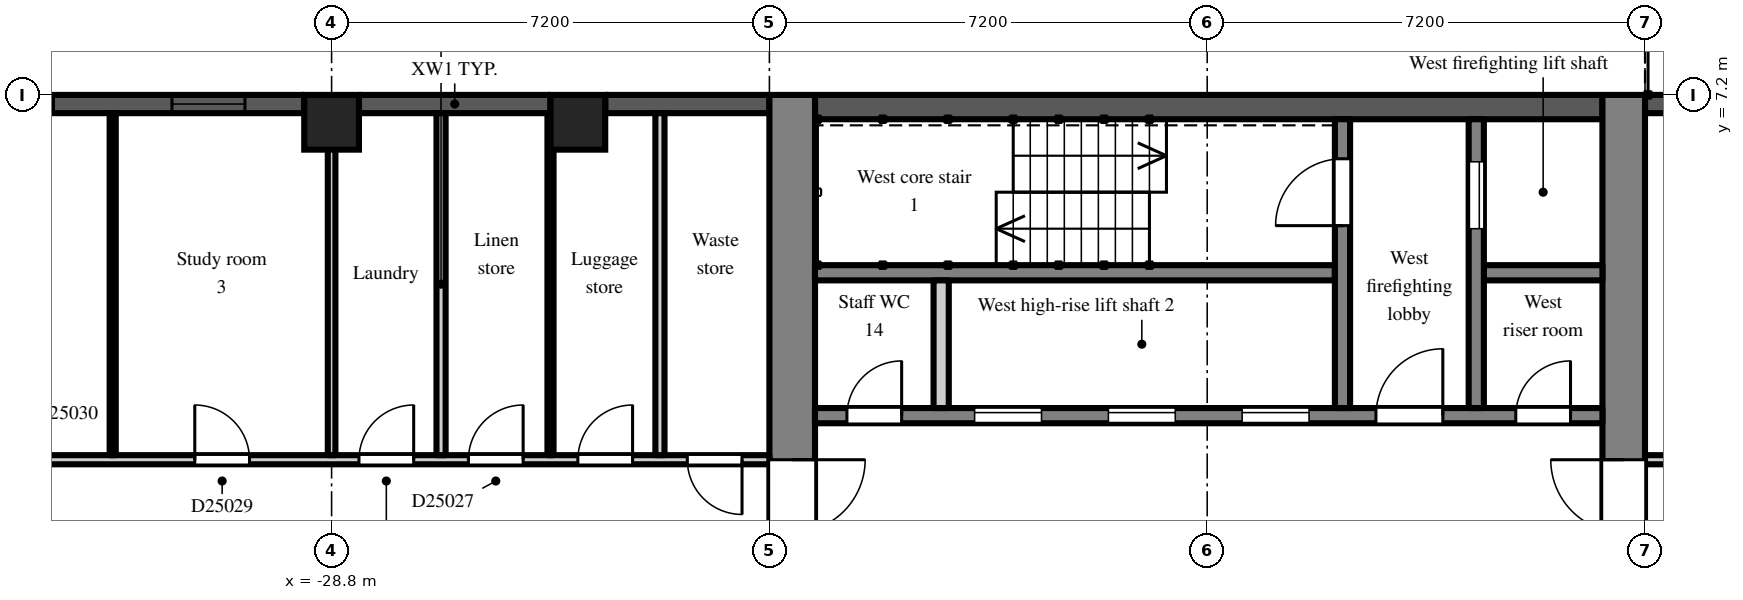
"""IFC4 building model, lengths in metres.
Left out: names, types, materials, properties, quantities, classifications, styles, units other than length and angle.
Written with IfcOpenShell. Run it as: python <this file> out.ifc"""

import sys

from ifc_helpers import new_model, si_unit, direction, frame, frame_2d, origin, origin_2d, place, context, subcontext, project, spatial, rectangle, extrude, element, fill, save


model = new_model("IFC4")
c1 = context("Model", 3, precision=1e-05, world=origin(), true_north=direction((0.0, 1.0)))
c2 = subcontext(c1, "Body", "Model", "MODEL_VIEW")
j1 = project(units=[si_unit("LENGTHUNIT", "METRE"), si_unit("PLANEANGLEUNIT", "RADIAN")], contexts=[c1])
p1 = place(None, origin())
s1 = spatial("IfcSite", under=j1, at=p1, CompositionType="ELEMENT")
p2 = place(p1, origin())
s2 = spatial("IfcBuilding", under=s1, at=p2, CompositionType="ELEMENT")
p3 = place(p2, frame((0.0, 0.0, 170.7)))
s3 = spatial("IfcBuildingStorey", under=s2, at=p3, CompositionType="ELEMENT", Elevation=170.7)
for number, where, z_axis, x_axis in (
    (1, (-28.8, 6.75, 0.0), (0.0, 0.0, 1.0), (1.0, 0.0, 0.0)),
    (2, (-24.75, 6.75, 0.0), (0.0, 0.0, 1.0), (1.0, 0.0, 0.0)),
):
    element("IfcColumn", number, at=place(p3, frame(where, z_axis=z_axis, x_axis=x_axis)), inside=s3, PredefinedType="COLUMN", context=c2, shape_type="SweptSolid", body=[
        extrude(rectangle(XDim=0.9, YDim=0.9, at=origin_2d()), origin(), (0.0, 0.0, 1.0), 3.0),
    ])
p4 = place(p3, frame((-4.2, 7.05, 0.0), z_axis=(0.0, 0.0, 1.0), x_axis=(-1.0, 0.0, 0.0)))
e3 = element("IfcWall", 3, at=p4, inside=s3, PredefinedType="SOLIDWALL", context=c2, shape_type="SweptSolid", body=[
    extrude(rectangle(XDim=3.0, YDim=0.3, at=frame_2d((1.5, 0.0))), origin(), (0.0, 0.0, 1.0), 2.2),
])
p5 = place(p3, frame((-21.6, 7.05, 0.0), z_axis=(0.0, 0.0, 1.0), x_axis=(-1.0, 0.0, 0.0)))
e4 = element("IfcWall", 4, at=p5, inside=s3, PredefinedType="SOLIDWALL", context=c2, shape_type="SweptSolid", body=[
    extrude(rectangle(XDim=2.7, YDim=0.3, at=frame_2d((1.35, 0.0))), origin(), (0.0, 0.0, 1.0), 2.2),
])
p6 = place(p3, frame((-25.2, 7.05, 0.0), z_axis=(0.0, 0.0, 1.0), x_axis=(-1.0, 0.0, 0.0)))
e5 = element("IfcWall", 5, at=p6, inside=s3, PredefinedType="SOLIDWALL", context=c2, shape_type="SweptSolid", body=[
    extrude(rectangle(XDim=3.15, YDim=0.3, at=frame_2d((1.575, 0.0))), origin(), (0.0, 0.0, 1.0), 2.2),
])
p7 = place(p3, frame((-29.25, 7.05, 0.0), z_axis=(0.0, 0.0, 1.0), x_axis=(-1.0, 0.0, 0.0)))
e6 = element("IfcWall", 6, at=p7, inside=s3, PredefinedType="SOLIDWALL", context=c2, shape_type="SweptSolid", body=[
    extrude(rectangle(XDim=6.3, YDim=0.3, at=frame_2d((3.15, 0.0))), origin(), (0.0, 0.0, 1.0), 2.2),
])
p8 = place(p7, frame((0.975, 0.0, 0.2)))
e7 = element("IfcOpeningElement", 7, at=p8, cuts=e6, PredefinedType="OPENING", context=c2, shape_type="SweptSolid", body=[
    extrude(rectangle(XDim=1.2, YDim=1.85, at=frame_2d((0.6, 0.925))), frame((0.0, 0.16, 0.0), z_axis=(0.0, -1.0, 0.0), x_axis=(1.0, 0.0, 0.0)), (0.0, 0.0, 1.0), 0.32),
])
p9 = place(p7, frame((4.125, 0.0, 0.2)))
e8 = element("IfcOpeningElement", 8, at=p9, cuts=e6, PredefinedType="OPENING", context=c2, shape_type="SweptSolid", body=[
    extrude(rectangle(XDim=1.2, YDim=1.85, at=frame_2d((0.6, 0.925))), frame((0.0, 0.16, 0.0), z_axis=(0.0, -1.0, 0.0), x_axis=(1.0, 0.0, 0.0)), (0.0, 0.0, 1.0), 0.32),
])
p10 = place(p3, frame((-7.55, -7.2, 0.0), z_axis=(0.0, 0.0, 1.0), x_axis=(0.0, 1.0, 0.0)))
e9 = element("IfcWall", 9, at=p10, inside=s3, PredefinedType="SHEAR", context=c2, shape_type="SweptSolid", body=[
    extrude(rectangle(XDim=14.4, YDim=0.7, at=frame_2d((7.2, 0.0))), origin(), (0.0, 0.0, 1.0), 2.6),
])
p11 = place(p10, frame((6.0, 0.0, 0.0)))
e10 = element("IfcOpeningElement", 10, at=p11, cuts=e9, PredefinedType="OPENING", context=c2, shape_type="SweptSolid", body=[
    extrude(rectangle(XDim=2.4, YDim=2.2, at=frame_2d((1.2, 1.1))), frame((0.0, 0.36, 0.0), z_axis=(0.0, -1.0, 0.0), x_axis=(1.0, 0.0, 0.0)), (0.0, 0.0, 1.0), 0.72),
])
p12 = place(p3, frame((-21.225, -7.2, 0.0), z_axis=(0.0, 0.0, 1.0), x_axis=(0.0, 1.0, 0.0)))
e11 = element("IfcWall", 11, at=p12, inside=s3, PredefinedType="SHEAR", context=c2, shape_type="SweptSolid", body=[
    extrude(rectangle(XDim=14.4, YDim=0.75, at=frame_2d((7.2, 0.0))), origin(), (0.0, 0.0, 1.0), 2.6),
])
p13 = place(p12, frame((6.0, 0.0, 0.0)))
e12 = element("IfcOpeningElement", 12, at=p13, cuts=e11, PredefinedType="OPENING", context=c2, shape_type="SweptSolid", body=[
    extrude(rectangle(XDim=2.4, YDim=2.2, at=frame_2d((1.2, 1.1))), frame((0.0, 0.385, 0.0), z_axis=(0.0, -1.0, 0.0), x_axis=(1.0, 0.0, 0.0)), (0.0, 0.0, 1.0), 0.77),
])
p14 = place(p3, frame((-7.9, 7.0, 0.0), z_axis=(0.0, 0.0, 1.0), x_axis=(-1.0, 0.0, 0.0)))
e13 = element("IfcWall", 13, at=p14, inside=s3, PredefinedType="SHEAR", context=c2, shape_type="SweptSolid", body=[
    extrude(rectangle(XDim=12.95, YDim=0.4, at=frame_2d((6.475, 0.0))), origin(), (0.0, 0.0, 1.0), 2.6),
])
p15 = place(p3, frame((-7.9, 1.925, 0.0), z_axis=(0.0, 0.0, 1.0), x_axis=(-1.0, 0.0, 0.0)))
e14 = element("IfcWall", 14, at=p15, inside=s3, PredefinedType="SHEAR", context=c2, shape_type="SweptSolid", body=[
    extrude(rectangle(XDim=12.95, YDim=0.25, at=frame_2d((6.475, 0.0))), origin(), (0.0, 0.0, 1.0), 2.6),
])
p16 = place(p15, frame((4.825, 0.0, 0.0)))
e15 = element("IfcOpeningElement", 15, at=p16, cuts=e14, PredefinedType="OPENING", context=c2, shape_type="SweptSolid", body=[
    extrude(rectangle(XDim=1.1, YDim=2.1, at=frame_2d((0.55, 1.05))), frame((0.0, 0.135, 0.0), z_axis=(0.0, -1.0, 0.0), x_axis=(1.0, 0.0, 0.0)), (0.0, 0.0, 1.0), 0.27),
])
p17 = place(p15, frame((7.025, 0.0, 0.0)))
e16 = element("IfcOpeningElement", 16, at=p17, cuts=e14, PredefinedType="OPENING", context=c2, shape_type="SweptSolid", body=[
    extrude(rectangle(XDim=1.1, YDim=2.1, at=frame_2d((0.55, 1.05))), frame((0.0, 0.135, 0.0), z_axis=(0.0, -1.0, 0.0), x_axis=(1.0, 0.0, 0.0)), (0.0, 0.0, 1.0), 0.27),
])
p18 = place(p15, frame((9.225, 0.0, 0.0)))
e17 = element("IfcOpeningElement", 17, at=p18, cuts=e14, PredefinedType="OPENING", context=c2, shape_type="SweptSolid", body=[
    extrude(rectangle(XDim=1.1, YDim=2.1, at=frame_2d((0.55, 1.05))), frame((0.0, 0.135, 0.0), z_axis=(0.0, -1.0, 0.0), x_axis=(1.0, 0.0, 0.0)), (0.0, 0.0, 1.0), 0.27),
])
p19 = place(p15, frame((0.525, 0.0, 0.0)))
e18 = element("IfcOpeningElement", 18, at=p19, cuts=e14, PredefinedType="OPENING", context=c2, shape_type="SweptSolid", body=[
    extrude(rectangle(XDim=0.9, YDim=2.1, at=frame_2d((0.45, 1.05))), frame((0.0, 0.135, 0.0), z_axis=(0.0, -1.0, 0.0), x_axis=(1.0, 0.0, 0.0)), (0.0, 0.0, 1.0), 0.27),
])
p20 = place(p15, frame((2.625, 0.0, 0.0)))
e19 = element("IfcOpeningElement", 19, at=p20, cuts=e14, PredefinedType="OPENING", context=c2, shape_type="SweptSolid", body=[
    extrude(rectangle(XDim=1.1, YDim=2.1, at=frame_2d((0.55, 1.05))), frame((0.0, 0.135, 0.0), z_axis=(0.0, -1.0, 0.0), x_axis=(1.0, 0.0, 0.0)), (0.0, 0.0, 1.0), 0.27),
])
p21 = place(p15, frame((11.525, 0.0, 0.0)))
e20 = element("IfcOpeningElement", 20, at=p21, cuts=e14, PredefinedType="OPENING", context=c2, shape_type="SweptSolid", body=[
    extrude(rectangle(XDim=0.9, YDim=2.1, at=frame_2d((0.45, 1.05))), frame((0.0, 0.135, 0.0), z_axis=(0.0, -1.0, 0.0), x_axis=(1.0, 0.0, 0.0)), (0.0, 0.0, 1.0), 0.27),
])
p22 = place(p3, frame((-7.9, 4.275, 0.0), z_axis=(0.0, 0.0, 1.0), x_axis=(-1.0, 0.0, 0.0)))
e21 = element("IfcWall", 21, at=p22, inside=s3, PredefinedType="SHEAR", context=c2, shape_type="SweptSolid", body=[
    extrude(rectangle(XDim=1.95, YDim=0.25, at=frame_2d((0.975, 0.0))), origin(), (0.0, 0.0, 1.0), 2.6),
])
p23 = place(p3, frame((-12.3, 4.275, 0.0), z_axis=(0.0, 0.0, 1.0), x_axis=(-1.0, 0.0, 0.0)))
e22 = element("IfcWall", 22, at=p23, inside=s3, PredefinedType="SHEAR", context=c2, shape_type="SweptSolid", body=[
    extrude(rectangle(XDim=8.55, YDim=0.25, at=frame_2d((4.275, 0.0))), origin(), (0.0, 0.0, 1.0), 2.6),
])
p24 = place(p3, frame((-9.975, 2.05, 0.0), z_axis=(0.0, 0.0, 1.0), x_axis=(0.0, 1.0, 0.0)))
e23 = element("IfcWall", 23, at=p24, inside=s3, PredefinedType="SHEAR", context=c2, shape_type="SweptSolid", body=[
    extrude(rectangle(XDim=4.75, YDim=0.25, at=frame_2d((2.375, 0.0))), origin(), (0.0, 0.0, 1.0), 2.6),
])
p25 = place(p24, frame((2.95, 0.0, 0.0)))
e24 = element("IfcOpeningElement", 24, at=p25, cuts=e23, PredefinedType="OPENING", context=c2, shape_type="SweptSolid", body=[
    extrude(rectangle(XDim=1.1, YDim=2.1, at=frame_2d((0.55, 1.05))), frame((0.0, 0.135, 0.0), z_axis=(0.0, -1.0, 0.0), x_axis=(1.0, 0.0, 0.0)), (0.0, 0.0, 1.0), 0.27),
])
p26 = place(p3, frame((-12.175, 2.05, 0.0), z_axis=(0.0, 0.0, 1.0), x_axis=(0.0, 1.0, 0.0)))
e25 = element("IfcWall", 25, at=p26, inside=s3, PredefinedType="SHEAR", context=c2, shape_type="SweptSolid", body=[
    extrude(rectangle(XDim=4.75, YDim=0.25, at=frame_2d((2.375, 0.0))), origin(), (0.0, 0.0, 1.0), 2.6),
])
p27 = place(p26, frame((3.0, 0.0, 0.0)))
e26 = element("IfcOpeningElement", 26, at=p27, cuts=e25, PredefinedType="OPENING", context=c2, shape_type="SweptSolid", body=[
    extrude(rectangle(XDim=1.1, YDim=2.1, at=frame_2d((0.55, 1.05))), frame((0.0, 0.135, 0.0), z_axis=(0.0, -1.0, 0.0), x_axis=(1.0, 0.0, 0.0)), (0.0, 0.0, 1.0), 0.27),
])
p28 = place(p3, frame((-18.775, 2.05, 0.0), z_axis=(0.0, 0.0, 1.0), x_axis=(0.0, 1.0, 0.0)))
e27 = element("IfcWall", 27, at=p28, inside=s3, PredefinedType="PARTITIONING", context=c2, shape_type="SweptSolid", body=[
    extrude(rectangle(XDim=2.1, YDim=0.25, at=frame_2d((1.05, 0.0))), origin(), (0.0, 0.0, 1.0), 2.6),
])
p29 = place(p3, frame((-36.5, 1.2, 0.0), z_axis=(0.0, 0.0, 1.0), x_axis=(1.0, 0.0, 0.0)))
e28 = element("IfcWall", 28, at=p29, inside=s3, PredefinedType="PARTITIONING", context=c2, shape_type="SweptSolid", body=[
    extrude(rectangle(XDim=14.9, YDim=0.15, at=frame_2d((7.45, 0.0))), origin(), (0.0, 0.0, 1.0), 2.6),
])
p30 = place(p29, frame((13.55, 0.0, 0.0)))
e29 = element("IfcOpeningElement", 29, at=p30, cuts=e28, PredefinedType="OPENING", context=c2, shape_type="SweptSolid", body=[
    extrude(rectangle(XDim=0.9, YDim=2.1, at=frame_2d((0.45, 1.05))), frame((0.0, 0.085, 0.0), z_axis=(0.0, -1.0, 0.0), x_axis=(1.0, 0.0, 0.0)), (0.0, 0.0, 1.0), 0.17),
])
p31 = place(p29, frame((11.75, 0.0, 0.0)))
e30 = element("IfcOpeningElement", 30, at=p31, cuts=e28, PredefinedType="OPENING", context=c2, shape_type="SweptSolid", body=[
    extrude(rectangle(XDim=0.9, YDim=2.1, at=frame_2d((0.45, 1.05))), frame((0.0, 0.085, 0.0), z_axis=(0.0, -1.0, 0.0), x_axis=(1.0, 0.0, 0.0)), (0.0, 0.0, 1.0), 0.17),
])
p32 = place(p29, frame((9.95, 0.0, 0.0)))
e31 = element("IfcOpeningElement", 31, at=p32, cuts=e28, PredefinedType="OPENING", context=c2, shape_type="SweptSolid", body=[
    extrude(rectangle(XDim=0.9, YDim=2.1, at=frame_2d((0.45, 1.05))), frame((0.0, 0.085, 0.0), z_axis=(0.0, -1.0, 0.0), x_axis=(1.0, 0.0, 0.0)), (0.0, 0.0, 1.0), 0.17),
])
p33 = place(p29, frame((8.15, 0.0, 0.0)))
e32 = element("IfcOpeningElement", 32, at=p33, cuts=e28, PredefinedType="OPENING", context=c2, shape_type="SweptSolid", body=[
    extrude(rectangle(XDim=0.9, YDim=2.1, at=frame_2d((0.45, 1.05))), frame((0.0, 0.085, 0.0), z_axis=(0.0, -1.0, 0.0), x_axis=(1.0, 0.0, 0.0)), (0.0, 0.0, 1.0), 0.17),
])
p34 = place(p29, frame((5.45, 0.0, 0.0)))
e33 = element("IfcOpeningElement", 33, at=p34, cuts=e28, PredefinedType="OPENING", context=c2, shape_type="SweptSolid", body=[
    extrude(rectangle(XDim=0.9, YDim=2.1, at=frame_2d((0.45, 1.05))), frame((0.0, 0.085, 0.0), z_axis=(0.0, -1.0, 0.0), x_axis=(1.0, 0.0, 0.0)), (0.0, 0.0, 1.0), 0.17),
])
p35 = place(p29, frame((1.15, 0.0, 0.0)))
e34 = element("IfcOpeningElement", 34, at=p35, cuts=e28, PredefinedType="OPENING", context=c2, shape_type="SweptSolid", body=[
    extrude(rectangle(XDim=1.8, YDim=2.1, at=frame_2d((0.9, 1.05))), frame((0.0, 0.085, 0.0), z_axis=(0.0, -1.0, 0.0), x_axis=(1.0, 0.0, 0.0)), (0.0, 0.0, 1.0), 0.17),
])
p36 = place(p3, frame((-32.4, 1.275, 0.0), z_axis=(0.0, 0.0, 1.0), x_axis=(0.0, 1.0, 0.0)))
e35 = element("IfcWall", 35, at=p36, inside=s3, PredefinedType="PARTITIONING", context=c2, shape_type="SweptSolid", body=[
    extrude(rectangle(XDim=5.625, YDim=0.1, at=frame_2d((2.812, 0.0))), origin(), (0.0, 0.0, 1.0), 2.6),
])
p37 = place(p3, frame((-28.8, 1.275, 0.0), z_axis=(0.0, 0.0, 1.0), x_axis=(0.0, 1.0, 0.0)))
e36 = element("IfcWall", 36, at=p37, inside=s3, PredefinedType="PARTITIONING", context=c2, shape_type="SweptSolid", body=[
    extrude(rectangle(XDim=5.625, YDim=0.125, at=frame_2d((2.812, 0.0))), origin(), (0.0, 0.0, 1.0), 2.6),
])
p38 = place(p3, frame((-27.0, 1.275, 0.0), z_axis=(0.0, 0.0, 1.0), x_axis=(0.0, 1.0, 0.0)))
e37 = element("IfcWall", 37, at=p38, inside=s3, PredefinedType="PARTITIONING", context=c2, shape_type="SweptSolid", body=[
    extrude(rectangle(XDim=5.625, YDim=0.15, at=frame_2d((2.812, 0.0))), origin(), (0.0, 0.0, 1.0), 2.6),
])
p39 = place(p3, frame((-25.2, 1.275, 0.0), z_axis=(0.0, 0.0, 1.0), x_axis=(0.0, 1.0, 0.0)))
e38 = element("IfcWall", 38, at=p39, inside=s3, PredefinedType="PARTITIONING", context=c2, shape_type="SweptSolid", body=[
    extrude(rectangle(XDim=5.625, YDim=0.1, at=frame_2d((2.812, 0.0))), origin(), (0.0, 0.0, 1.0), 2.6),
])
p40 = place(p3, frame((-23.4, 1.275, 0.0), z_axis=(0.0, 0.0, 1.0), x_axis=(0.0, 1.0, 0.0)))
e39 = element("IfcWall", 39, at=p40, inside=s3, PredefinedType="PARTITIONING", context=c2, shape_type="SweptSolid", body=[
    extrude(rectangle(XDim=5.625, YDim=0.15, at=frame_2d((2.812, 0.0))), origin(), (0.0, 0.0, 1.0), 2.6),
])
p41 = place(p3, frame((-7.2, 1.2, 0.0), z_axis=(0.0, 0.0, 1.0), x_axis=(1.0, 0.0, 0.0)))
e40 = element("IfcWall", 40, at=p41, inside=s3, PredefinedType="PARTITIONING", context=c2, shape_type="SweptSolid", body=[
    extrude(rectangle(XDim=6.075, YDim=0.15, at=frame_2d((3.038, 0.0))), origin(), (0.0, 0.0, 1.0), 2.6),
])
p42 = place(p41, frame((1.55, 0.0, 0.0)))
e41 = element("IfcOpeningElement", 41, at=p42, cuts=e40, PredefinedType="OPENING", context=c2, shape_type="SweptSolid", body=[
    extrude(rectangle(XDim=0.9, YDim=2.1, at=frame_2d((0.45, 1.05))), frame((0.0, 0.085, 0.0), z_axis=(0.0, -1.0, 0.0), x_axis=(1.0, 0.0, 0.0)), (0.0, 0.0, 1.0), 0.17),
])
p43 = place(p8, origin())
e42 = element("IfcWindow", 42, at=p43, inside=s3, PartitioningType="SINGLE_PANEL", PredefinedType="WINDOW", context=c2, shape_type="SweptSolid", body=[
    extrude(rectangle(XDim=1.2, YDim=1.85, at=frame_2d((0.6, 0.925))), frame((0.0, 0.03, 0.0), z_axis=(0.0, -1.0, 0.0), x_axis=(1.0, 0.0, 0.0)), (0.0, 0.0, 1.0), 0.06),
])
fill(e7, e42)
p44 = place(p9, origin())
e43 = element("IfcWindow", 43, at=p44, inside=s3, PartitioningType="SINGLE_PANEL", PredefinedType="WINDOW", context=c2, shape_type="SweptSolid", body=[
    extrude(rectangle(XDim=1.2, YDim=1.85, at=frame_2d((0.6, 0.925))), frame((0.0, 0.03, 0.0), z_axis=(0.0, -1.0, 0.0), x_axis=(1.0, 0.0, 0.0)), (0.0, 0.0, 1.0), 0.06),
])
fill(e8, e43)
p45 = place(p16, origin())
e44 = element("IfcDoor", 44, at=p45, inside=s3, OperationType="SLIDING_TO_LEFT", PredefinedType="DOOR", context=c2, shape_type="SweptSolid", body=[
    extrude(rectangle(XDim=1.1, YDim=2.1, at=frame_2d((0.55, 1.05))), frame((0.0, 0.025, 0.0), z_axis=(0.0, -1.0, 0.0), x_axis=(1.0, 0.0, 0.0)), (0.0, 0.0, 1.0), 0.05),
])
fill(e15, e44)
p46 = place(p17, origin())
e45 = element("IfcDoor", 45, at=p46, inside=s3, OperationType="SLIDING_TO_LEFT", PredefinedType="DOOR", context=c2, shape_type="SweptSolid", body=[
    extrude(rectangle(XDim=1.1, YDim=2.1, at=frame_2d((0.55, 1.05))), frame((0.0, 0.025, 0.0), z_axis=(0.0, -1.0, 0.0), x_axis=(1.0, 0.0, 0.0)), (0.0, 0.0, 1.0), 0.05),
])
fill(e16, e45)
p47 = place(p18, origin())
e46 = element("IfcDoor", 46, at=p47, inside=s3, OperationType="SLIDING_TO_LEFT", PredefinedType="DOOR", context=c2, shape_type="SweptSolid", body=[
    extrude(rectangle(XDim=1.1, YDim=2.1, at=frame_2d((0.55, 1.05))), frame((0.0, 0.025, 0.0), z_axis=(0.0, -1.0, 0.0), x_axis=(1.0, 0.0, 0.0)), (0.0, 0.0, 1.0), 0.05),
])
fill(e17, e46)
p48 = place(p25, origin())
e47 = element("IfcDoor", 47, at=p48, inside=s3, OperationType="SLIDING_TO_LEFT", PredefinedType="DOOR", context=c2, shape_type="SweptSolid", body=[
    extrude(rectangle(XDim=1.1, YDim=2.1, at=frame_2d((0.55, 1.05))), frame((0.0, 0.025, 0.0), z_axis=(0.0, -1.0, 0.0), x_axis=(1.0, 0.0, 0.0)), (0.0, 0.0, 1.0), 0.05),
])
fill(e24, e47)
p49 = place(p27, origin())
e48 = element("IfcDoor", 48, at=p49, inside=s3, OperationType="SINGLE_SWING_LEFT", PredefinedType="DOOR", context=c2, shape_type="SweptSolid", body=[
    extrude(rectangle(XDim=1.1, YDim=2.1, at=frame_2d((0.55, 1.05))), frame((0.0, 0.025, 0.0), z_axis=(0.0, -1.0, 0.0), x_axis=(1.0, 0.0, 0.0)), (0.0, 0.0, 1.0), 0.05),
])
fill(e26, e48)
p50 = place(p19, frame((0.9, 0.0, 0.0), z_axis=(0.0, 0.0, 1.0), x_axis=(-1.0, 0.0, 0.0)))
e49 = element("IfcDoor", 49, at=p50, inside=s3, OperationType="SINGLE_SWING_RIGHT", PredefinedType="DOOR", context=c2, shape_type="SweptSolid", body=[
    extrude(rectangle(XDim=0.9, YDim=2.1, at=frame_2d((0.45, 1.05))), frame((0.0, 0.025, 0.0), z_axis=(0.0, -1.0, 0.0), x_axis=(1.0, 0.0, 0.0)), (0.0, 0.0, 1.0), 0.05),
])
fill(e18, e49)
p51 = place(p20, frame((1.1, 0.0, 0.0), z_axis=(0.0, 0.0, 1.0), x_axis=(-1.0, 0.0, 0.0)))
e50 = element("IfcDoor", 50, at=p51, inside=s3, OperationType="SINGLE_SWING_RIGHT", PredefinedType="DOOR", context=c2, shape_type="SweptSolid", body=[
    extrude(rectangle(XDim=1.1, YDim=2.1, at=frame_2d((0.55, 1.05))), frame((0.0, 0.025, 0.0), z_axis=(0.0, -1.0, 0.0), x_axis=(1.0, 0.0, 0.0)), (0.0, 0.0, 1.0), 0.05),
])
fill(e19, e50)
p52 = place(p11, origin())
e51 = element("IfcDoor", 51, at=p52, inside=s3, OperationType="DOUBLE_DOOR_DOUBLE_SWING", PredefinedType="DOOR", context=c2, shape_type="SweptSolid", body=[
    extrude(rectangle(XDim=2.4, YDim=2.2, at=frame_2d((1.2, 1.1))), frame((0.0, 0.025, 0.0), z_axis=(0.0, -1.0, 0.0), x_axis=(1.0, 0.0, 0.0)), (0.0, 0.0, 1.0), 0.05),
])
fill(e10, e51)
p53 = place(p13, frame((2.4, 0.0, 0.0), z_axis=(0.0, 0.0, 1.0), x_axis=(-1.0, 0.0, 0.0)))
e52 = element("IfcDoor", 52, at=p53, inside=s3, OperationType="DOUBLE_DOOR_DOUBLE_SWING", PredefinedType="DOOR", context=c2, shape_type="SweptSolid", body=[
    extrude(rectangle(XDim=2.4, YDim=2.2, at=frame_2d((1.2, 1.1))), frame((0.0, 0.025, 0.0), z_axis=(0.0, -1.0, 0.0), x_axis=(1.0, 0.0, 0.0)), (0.0, 0.0, 1.0), 0.05),
])
fill(e12, e52)
p54 = place(p21, frame((0.9, 0.0, 0.0), z_axis=(0.0, 0.0, 1.0), x_axis=(-1.0, 0.0, 0.0)))
e53 = element("IfcDoor", 53, at=p54, inside=s3, OperationType="SINGLE_SWING_RIGHT", PredefinedType="DOOR", context=c2, shape_type="SweptSolid", body=[
    extrude(rectangle(XDim=0.9, YDim=2.1, at=frame_2d((0.45, 1.05))), frame((0.0, 0.025, 0.0), z_axis=(0.0, -1.0, 0.0), x_axis=(1.0, 0.0, 0.0)), (0.0, 0.0, 1.0), 0.05),
])
fill(e20, e53)
p55 = place(p30, frame((0.9, 0.0, 0.0), z_axis=(0.0, 0.0, 1.0), x_axis=(-1.0, 0.0, 0.0)))
e54 = element("IfcDoor", 54, at=p55, inside=s3, OperationType="SINGLE_SWING_LEFT", PredefinedType="DOOR", context=c2, shape_type="SweptSolid", body=[
    extrude(rectangle(XDim=0.9, YDim=2.1, at=frame_2d((0.45, 1.05))), frame((0.0, 0.025, 0.0), z_axis=(0.0, -1.0, 0.0), x_axis=(1.0, 0.0, 0.0)), (0.0, 0.0, 1.0), 0.05),
])
fill(e29, e54)
p56 = place(p31, origin())
e55 = element("IfcDoor", 55, at=p56, inside=s3, OperationType="SINGLE_SWING_RIGHT", PredefinedType="DOOR", context=c2, shape_type="SweptSolid", body=[
    extrude(rectangle(XDim=0.9, YDim=2.1, at=frame_2d((0.45, 1.05))), frame((0.0, 0.025, 0.0), z_axis=(0.0, -1.0, 0.0), x_axis=(1.0, 0.0, 0.0)), (0.0, 0.0, 1.0), 0.05),
])
fill(e30, e55)
p57 = place(p32, origin())
e56 = element("IfcDoor", 56, at=p57, inside=s3, OperationType="SINGLE_SWING_RIGHT", PredefinedType="DOOR", context=c2, shape_type="SweptSolid", body=[
    extrude(rectangle(XDim=0.9, YDim=2.1, at=frame_2d((0.45, 1.05))), frame((0.0, 0.025, 0.0), z_axis=(0.0, -1.0, 0.0), x_axis=(1.0, 0.0, 0.0)), (0.0, 0.0, 1.0), 0.05),
])
fill(e31, e56)
p58 = place(p33, origin())
e57 = element("IfcDoor", 57, at=p58, inside=s3, OperationType="SINGLE_SWING_RIGHT", PredefinedType="DOOR", context=c2, shape_type="SweptSolid", body=[
    extrude(rectangle(XDim=0.9, YDim=2.1, at=frame_2d((0.45, 1.05))), frame((0.0, 0.025, 0.0), z_axis=(0.0, -1.0, 0.0), x_axis=(1.0, 0.0, 0.0)), (0.0, 0.0, 1.0), 0.05),
])
fill(e32, e57)
p59 = place(p34, origin())
e58 = element("IfcDoor", 58, at=p59, inside=s3, OperationType="SINGLE_SWING_LEFT", PredefinedType="DOOR", context=c2, shape_type="SweptSolid", body=[
    extrude(rectangle(XDim=0.9, YDim=2.1, at=frame_2d((0.45, 1.05))), frame((0.0, 0.025, 0.0), z_axis=(0.0, -1.0, 0.0), x_axis=(1.0, 0.0, 0.0)), (0.0, 0.0, 1.0), 0.05),
])
fill(e33, e58)
save(model, sys.argv[1])
